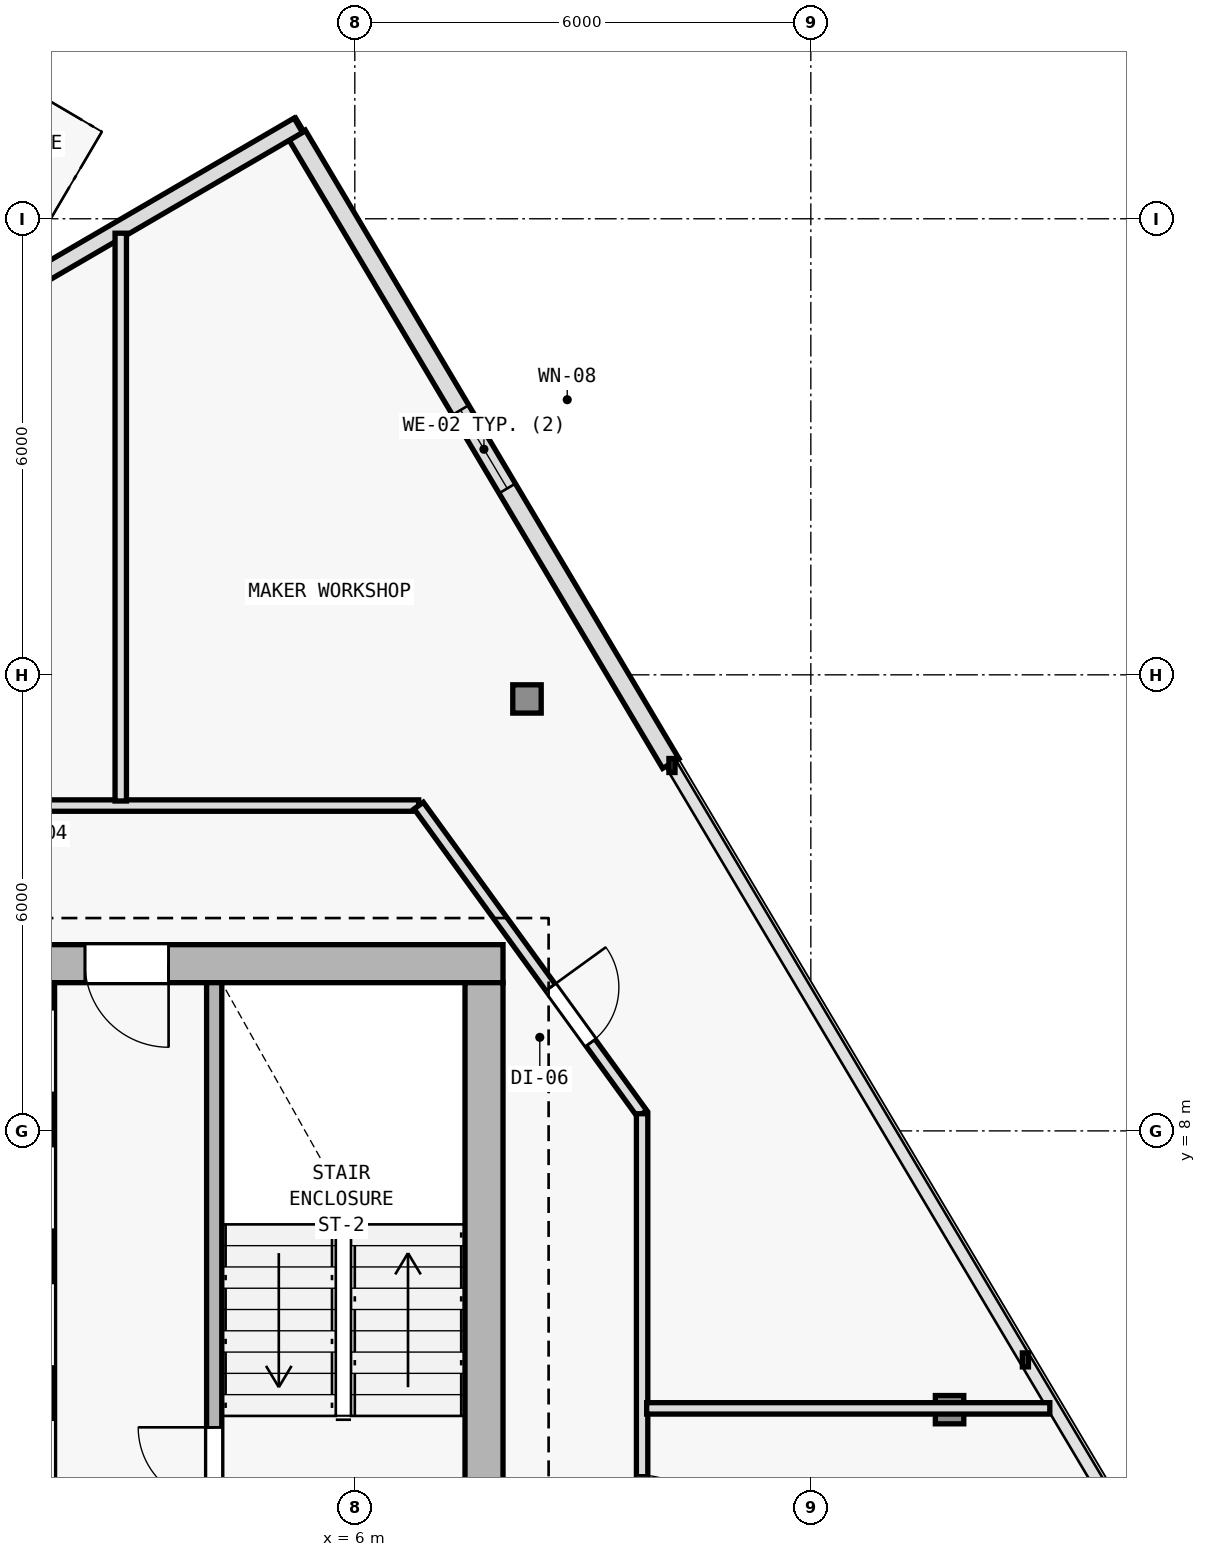
"""IFC4 building model, lengths in metres.
Left out: names, types, materials, properties, quantities, classifications, styles, units other than length and angle.
Written with IfcOpenShell. Run it as: python <this file> out.ifc"""

import sys

from ifc_helpers import new_model, si_unit, direction, frame, frame_2d, origin, origin_2d, place, context, subcontext, project, spatial, rectangle, i_section, extrude, element, fill, save


model = new_model("IFC4")
c1 = context("Model", 3, precision=1e-05, world=origin(), true_north=direction((0.0, 1.0)))
c2 = subcontext(c1, "Body", "Model", "MODEL_VIEW")
j1 = project(units=[si_unit("LENGTHUNIT", "METRE"), si_unit("PLANEANGLEUNIT", "RADIAN")], contexts=[c1])
p1 = place(None, origin())
s1 = spatial("IfcSite", under=j1, at=p1, CompositionType="ELEMENT")
p2 = place(p1, origin())
s2 = spatial("IfcBuilding", under=s1, at=p2, CompositionType="ELEMENT")
p3 = place(p2, frame((0.0, 0.0, 258.0)))
s3 = spatial("IfcBuildingStorey", under=s2, at=p3, CompositionType="ELEMENT", Elevation=258.0)
p4 = place(p3, frame((7.7, 10.2, 0.0), z_axis=(0.0, 0.0, 1.0), x_axis=(1.0, 0.0, 0.0)))
e1 = element("IfcColumn", 1, at=p4, inside=s3, PredefinedType="COLUMN", context=c2, shape_type="SweptSolid", body=[
    extrude(i_section(OverallWidth=0.374, OverallDepth=0.372, WebThickness=0.012, FlangeThickness=0.02, FilletRadius=0.015, at=origin_2d()), origin(), (0.0, 0.0, 1.0), 3.6),
])
p5 = place(p3, frame((13.825, 4.332, 0.006), z_axis=(-0.018907326549, 0.00952167524, 0.999775900241), x_axis=(-0.449781931574, -0.893138406984, 0.0)))
e2 = element("IfcColumn", 2, at=p5, inside=s3, PredefinedType="COLUMN", context=c2, shape_type="SweptSolid", body=[
    extrude(i_section(OverallWidth=0.374, OverallDepth=0.372, WebThickness=0.012, FlangeThickness=0.02, FilletRadius=0.015, at=origin_2d()), origin(), (0.0, 0.0, 1.0), 3.59),
])
p6 = place(p3, frame((8.265, 13.683, 0.006), z_axis=(-0.011699842352, -0.002516826552, 0.999928387072), x_axis=(0.210305364179, -0.977635746993, 0.0)))
e3 = element("IfcColumn", 3, at=p6, inside=s3, PredefinedType="COLUMN", context=c2, shape_type="SweptSolid", body=[
    extrude(i_section(OverallWidth=0.374, OverallDepth=0.372, WebThickness=0.012, FlangeThickness=0.02, FilletRadius=0.015, at=origin_2d()), origin(), (0.0, 0.0, 1.0), 3.589),
])
p7 = place(p3, frame((5.24, 21.103, 0.0), z_axis=(0.0, 0.0, 1.0), x_axis=(0.511088566076, -0.859528055171, 0.0)))
e4 = element("IfcWall", 4, at=p7, inside=s3, PredefinedType="SOLIDWALL", context=c2, shape_type="SweptSolid", body=[
    extrude(rectangle(XDim=9.622, YDim=0.25, at=frame_2d((4.811, 0.0))), origin(), (0.0, 0.0, 1.0), 3.35),
])
p8 = place(p7, frame((4.211, 0.0, 0.62)))
e5 = element("IfcOpeningElement", 5, at=p8, cuts=e4, PredefinedType="OPENING", context=c2, shape_type="SweptSolid", body=[
    extrude(rectangle(XDim=1.2, YDim=1.8, at=frame_2d((0.6, 0.9))), frame((0.0, 0.135, 0.0), z_axis=(0.0, -1.0, 0.0), x_axis=(1.0, 0.0, 0.0)), (0.0, 0.0, 1.0), 0.27),
])
p9 = place(p3, frame((1.832, 19.234, 0.0), z_axis=(0.0, 0.0, 1.0), x_axis=(0.86397765749, 0.503530145432, 0.0)))
e6 = element("IfcWall", 6, at=p9, inside=s3, PredefinedType="SOLIDWALL", context=c2, shape_type="SweptSolid", body=[
    extrude(rectangle(XDim=3.964, YDim=0.22, at=frame_2d((1.982, 0.0))), origin(), (0.0, 0.0, 1.0), 3.35),
])
p10 = place(p3, frame((7.95, 10.2, 0.0), z_axis=(0.0, 0.0, 1.0), x_axis=(-1.0, 0.0, 0.0)))
e7 = element("IfcWall", 7, at=p10, inside=s3, PredefinedType="SHEAR", context=c2, shape_type="SweptSolid", body=[
    extrude(rectangle(XDim=15.9, YDim=0.5, at=frame_2d((7.95, 0.0))), origin(), (0.0, 0.0, 1.0), 3.35),
])
p11 = place(p10, frame((4.4, 0.0, 0.0)))
e8 = element("IfcOpeningElement", 8, at=p11, cuts=e7, PredefinedType="OPENING", context=c2, shape_type="SweptSolid", body=[
    extrude(rectangle(XDim=1.1, YDim=2.15, at=frame_2d((0.55, 1.075))), frame((0.0, 0.26, 0.0), z_axis=(0.0, -1.0, 0.0), x_axis=(1.0, 0.0, 0.0)), (0.0, 0.0, 1.0), 0.52),
])
p12 = place(p3, frame((7.7, 9.95, 0.0), z_axis=(0.0, 0.0, 1.0), x_axis=(0.0, -1.0, 0.0)))
e9 = element("IfcWall", 9, at=p12, inside=s3, PredefinedType="SHEAR", context=c2, shape_type="SweptSolid", body=[
    extrude(rectangle(XDim=19.1, YDim=0.5, at=frame_2d((9.55, 0.0))), origin(), (0.0, 0.0, 1.0), 3.35),
])
p13 = place(p3, frame((4.15, 2.75, 0.0), z_axis=(0.0, 0.0, 1.0), x_axis=(0.0, 1.0, 0.0)))
e10 = element("IfcWall", 10, at=p13, inside=s3, PredefinedType="SOLIDWALL", context=c2, shape_type="SweptSolid", body=[
    extrude(rectangle(XDim=7.2, YDim=0.2, at=frame_2d((3.6, 0.0))), origin(), (0.0, 0.0, 1.0), 3.35),
])
p14 = place(p13, frame((0.35, 0.0, 0.0)))
e11 = element("IfcOpeningElement", 11, at=p14, cuts=e10, PredefinedType="OPENING", context=c2, shape_type="SweptSolid", body=[
    extrude(rectangle(XDim=1.0, YDim=2.15, at=frame_2d((0.5, 1.075))), frame((0.0, 0.11, 0.0), z_axis=(0.0, -1.0, 0.0), x_axis=(1.0, 0.0, 0.0)), (0.0, 0.0, 1.0), 0.22),
])
p15 = place(p3, frame((1.95, 2.65, 0.0), z_axis=(0.0, 0.0, 1.0), x_axis=(0.0, 1.0, 0.0)))
e12 = element("IfcWall", 12, at=p15, inside=s3, PredefinedType="SOLIDWALL", context=c2, shape_type="SweptSolid", body=[
    extrude(rectangle(XDim=7.295, YDim=0.2, at=frame_2d((3.647, 0.0))), origin(), (0.0, 0.0, 1.0), 3.35),
])
p16 = place(p15, frame((0.45, 0.0, 0.0)))
e13 = element("IfcOpeningElement", 13, at=p16, cuts=e12, PredefinedType="OPENING", context=c2, shape_type="SweptSolid", body=[
    extrude(rectangle(XDim=1.1, YDim=2.15, at=frame_2d((0.55, 1.075))), frame((0.0, 0.11, 0.0), z_axis=(0.0, -1.0, 0.0), x_axis=(1.0, 0.0, 0.0)), (0.0, 0.0, 1.0), 0.22),
])
p17 = place(p15, frame((2.25, 0.0, 0.0)))
e14 = element("IfcOpeningElement", 14, at=p17, cuts=e12, PredefinedType="OPENING", context=c2, shape_type="SweptSolid", body=[
    extrude(rectangle(XDim=1.1, YDim=2.15, at=frame_2d((0.55, 1.075))), frame((0.0, 0.11, 0.0), z_axis=(0.0, -1.0, 0.0), x_axis=(1.0, 0.0, 0.0)), (0.0, 0.0, 1.0), 0.22),
])
p18 = place(p15, frame((4.05, 0.0, 0.0)))
e15 = element("IfcOpeningElement", 15, at=p18, cuts=e12, PredefinedType="OPENING", context=c2, shape_type="SweptSolid", body=[
    extrude(rectangle(XDim=1.1, YDim=2.15, at=frame_2d((0.55, 1.075))), frame((0.0, 0.11, 0.0), z_axis=(0.0, -1.0, 0.0), x_axis=(1.0, 0.0, 0.0)), (0.0, 0.0, 1.0), 0.22),
])
p19 = place(p15, frame((5.85, 0.0, 0.0)))
e16 = element("IfcOpeningElement", 16, at=p19, cuts=e12, PredefinedType="OPENING", context=c2, shape_type="SweptSolid", body=[
    extrude(rectangle(XDim=1.1, YDim=2.15, at=frame_2d((0.55, 1.075))), frame((0.0, 0.11, 0.0), z_axis=(0.0, -1.0, 0.0), x_axis=(1.0, 0.0, 0.0)), (0.0, 0.0, 1.0), 0.22),
])
p20 = place(p3, frame((-6.841, 12.28, 0.0), z_axis=(0.0, 0.0, 1.0), x_axis=(1.0, 0.0, 0.0)))
e17 = element("IfcWall", 17, at=p20, inside=s3, PredefinedType="PARTITIONING", context=c2, shape_type="SweptSolid", body=[
    extrude(rectangle(XDim=13.682, YDim=0.15, at=frame_2d((6.841, 0.0))), origin(), (0.0, 0.0, 1.0), 3.015),
])
p21 = place(p20, frame((4.845, 0.0, 0.0)))
e18 = element("IfcOpeningElement", 18, at=p21, cuts=e17, PredefinedType="OPENING", context=c2, shape_type="SweptSolid", body=[
    extrude(rectangle(XDim=0.9, YDim=2.1, at=frame_2d((0.45, 1.05))), frame((0.0, 0.085, 0.0), z_axis=(0.0, -1.0, 0.0), x_axis=(1.0, 0.0, 0.0)), (0.0, 0.0, 1.0), 0.17),
])
p22 = place(p3, frame((6.841, 12.28, 0.0), z_axis=(0.0, 0.0, 1.0), x_axis=(0.586956386413, -0.809618552436, 0.0)))
e19 = element("IfcWall", 19, at=p22, inside=s3, PredefinedType="PARTITIONING", context=c2, shape_type="SweptSolid", body=[
    extrude(rectangle(XDim=5.008, YDim=0.15, at=frame_2d((2.504, 0.0))), origin(), (0.0, 0.0, 1.0), 2.875),
])
p23 = place(p22, frame((2.954, 0.0, 0.0)))
e20 = element("IfcOpeningElement", 20, at=p23, cuts=e19, PredefinedType="OPENING", context=c2, shape_type="SweptSolid", body=[
    extrude(rectangle(XDim=0.9, YDim=2.1, at=frame_2d((0.45, 1.05))), frame((0.0, 0.085, 0.0), z_axis=(0.0, -1.0, 0.0), x_axis=(1.0, 0.0, 0.0)), (0.0, 0.0, 1.0), 0.17),
])
p24 = place(p3, frame((9.78, 8.226, 0.0), z_axis=(0.0, 0.0, 1.0), x_axis=(0.0, -1.0, 0.0)))
e21 = element("IfcWall", 21, at=p24, inside=s3, PredefinedType="PARTITIONING", context=c2, shape_type="SweptSolid", body=[
    extrude(rectangle(XDim=19.706, YDim=0.15, at=frame_2d((9.853, 0.0))), origin(), (0.0, 0.0, 1.0), 2.725),
])
p25 = place(p24, frame((17.412, 0.0, 0.0)))
e22 = element("IfcOpeningElement", 22, at=p25, cuts=e21, PredefinedType="OPENING", context=c2, shape_type="SweptSolid", body=[
    extrude(rectangle(XDim=0.9, YDim=2.1, at=frame_2d((0.45, 1.05))), frame((0.0, 0.085, 0.0), z_axis=(0.0, -1.0, 0.0), x_axis=(1.0, 0.0, 0.0)), (0.0, 0.0, 1.0), 0.17),
])
p26 = place(p24, frame((15.036, 0.0, 0.0)))
e23 = element("IfcOpeningElement", 23, at=p26, cuts=e21, PredefinedType="OPENING", context=c2, shape_type="SweptSolid", body=[
    extrude(rectangle(XDim=0.85, YDim=2.1, at=frame_2d((0.425, 1.05))), frame((0.0, 0.085, 0.0), z_axis=(0.0, -1.0, 0.0), x_axis=(1.0, 0.0, 0.0)), (0.0, 0.0, 1.0), 0.17),
])
p27 = place(p24, frame((13.54, 0.0, 0.0)))
e24 = element("IfcOpeningElement", 24, at=p27, cuts=e21, PredefinedType="OPENING", context=c2, shape_type="SweptSolid", body=[
    extrude(rectangle(XDim=0.85, YDim=2.1, at=frame_2d((0.425, 1.05))), frame((0.0, 0.085, 0.0), z_axis=(0.0, -1.0, 0.0), x_axis=(1.0, 0.0, 0.0)), (0.0, 0.0, 1.0), 0.17),
])
p28 = place(p24, frame((11.975, 0.0, 0.0)))
e25 = element("IfcOpeningElement", 25, at=p28, cuts=e21, PredefinedType="OPENING", context=c2, shape_type="SweptSolid", body=[
    extrude(rectangle(XDim=0.85, YDim=2.1, at=frame_2d((0.425, 1.05))), frame((0.0, 0.085, 0.0), z_axis=(0.0, -1.0, 0.0), x_axis=(1.0, 0.0, 0.0)), (0.0, 0.0, 1.0), 0.17),
])
p29 = place(p24, frame((9.9, 0.0, 0.0)))
e26 = element("IfcOpeningElement", 26, at=p29, cuts=e21, PredefinedType="OPENING", context=c2, shape_type="SweptSolid", body=[
    extrude(rectangle(XDim=0.9, YDim=2.1, at=frame_2d((0.45, 1.05))), frame((0.0, 0.085, 0.0), z_axis=(0.0, -1.0, 0.0), x_axis=(1.0, 0.0, 0.0)), (0.0, 0.0, 1.0), 0.17),
])
p30 = place(p24, frame((7.347, 0.0, 0.0)))
e27 = element("IfcOpeningElement", 27, at=p30, cuts=e21, PredefinedType="OPENING", context=c2, shape_type="SweptSolid", body=[
    extrude(rectangle(XDim=0.9, YDim=2.1, at=frame_2d((0.45, 1.05))), frame((0.0, 0.085, 0.0), z_axis=(0.0, -1.0, 0.0), x_axis=(1.0, 0.0, 0.0)), (0.0, 0.0, 1.0), 0.17),
])
p31 = place(p24, frame((4.758, 0.0, 0.0)))
e28 = element("IfcOpeningElement", 28, at=p31, cuts=e21, PredefinedType="OPENING", context=c2, shape_type="SweptSolid", body=[
    extrude(rectangle(XDim=0.9, YDim=2.1, at=frame_2d((0.45, 1.05))), frame((0.0, 0.085, 0.0), z_axis=(0.0, -1.0, 0.0), x_axis=(1.0, 0.0, 0.0)), (0.0, 0.0, 1.0), 0.17),
])
p32 = place(p3, frame((9.84, 4.349, 0.0), z_axis=(0.0, 0.0, 1.0), x_axis=(1.0, 0.0, 0.0)))
e29 = element("IfcWall", 29, at=p32, inside=s3, PredefinedType="PARTITIONING", context=c2, shape_type="SweptSolid", body=[
    extrude(rectangle(XDim=5.304, YDim=0.15, at=frame_2d((2.652, 0.0))), origin(), (0.0, 0.0, 1.0), 2.875),
])
p33 = place(p3, frame((2.92, 12.34, 0.0), z_axis=(0.0, 0.0, 1.0), x_axis=(0.0, 1.0, 0.0)))
e30 = element("IfcWall", 30, at=p33, inside=s3, PredefinedType="PARTITIONING", context=c2, shape_type="SweptSolid", body=[
    extrude(rectangle(XDim=7.47, YDim=0.15, at=frame_2d((3.735, 0.0))), origin(), (0.0, 0.0, 1.0), 3.015),
])
p34 = place(p8, origin())
e31 = element("IfcWindow", 31, at=p34, inside=s3, PartitioningType="SINGLE_PANEL", PredefinedType="WINDOW", context=c2, shape_type="SweptSolid", body=[
    extrude(rectangle(XDim=1.2, YDim=1.8, at=frame_2d((0.6, 0.9))), frame((0.0, 0.03, 0.0), z_axis=(0.0, -1.0, 0.0), x_axis=(1.0, 0.0, 0.0)), (0.0, 0.0, 1.0), 0.06),
])
fill(e5, e31)
p35 = place(p11, origin())
e32 = element("IfcDoor", 32, at=p35, inside=s3, OperationType="SINGLE_SWING_LEFT", PredefinedType="DOOR", context=c2, shape_type="SweptSolid", body=[
    extrude(rectangle(XDim=1.1, YDim=2.15, at=frame_2d((0.55, 1.075))), frame((0.0, 0.025, 0.0), z_axis=(0.0, -1.0, 0.0), x_axis=(1.0, 0.0, 0.0)), (0.0, 0.0, 1.0), 0.05),
])
fill(e8, e32)
p36 = place(p14, origin())
e33 = element("IfcDoor", 33, at=p36, inside=s3, OperationType="SINGLE_SWING_RIGHT", PredefinedType="DOOR", context=c2, shape_type="SweptSolid", body=[
    extrude(rectangle(XDim=1.0, YDim=2.15, at=frame_2d((0.5, 1.075))), frame((0.0, 0.025, 0.0), z_axis=(0.0, -1.0, 0.0), x_axis=(1.0, 0.0, 0.0)), (0.0, 0.0, 1.0), 0.05),
])
fill(e11, e33)
p37 = place(p31, origin())
e34 = element("IfcDoor", 34, at=p37, inside=s3, OperationType="SINGLE_SWING_RIGHT", PredefinedType="DOOR", context=c2, shape_type="SweptSolid", body=[
    extrude(rectangle(XDim=0.9, YDim=2.1, at=frame_2d((0.45, 1.05))), frame((0.0, 0.025, 0.0), z_axis=(0.0, -1.0, 0.0), x_axis=(1.0, 0.0, 0.0)), (0.0, 0.0, 1.0), 0.05),
])
fill(e28, e34)
p38 = place(p23, origin())
e35 = element("IfcDoor", 35, at=p38, inside=s3, OperationType="SINGLE_SWING_LEFT", PredefinedType="DOOR", context=c2, shape_type="SweptSolid", body=[
    extrude(rectangle(XDim=0.9, YDim=2.1, at=frame_2d((0.45, 1.05))), frame((0.0, 0.025, 0.0), z_axis=(0.0, -1.0, 0.0), x_axis=(1.0, 0.0, 0.0)), (0.0, 0.0, 1.0), 0.05),
])
fill(e20, e35)
save(model, sys.argv[1])
